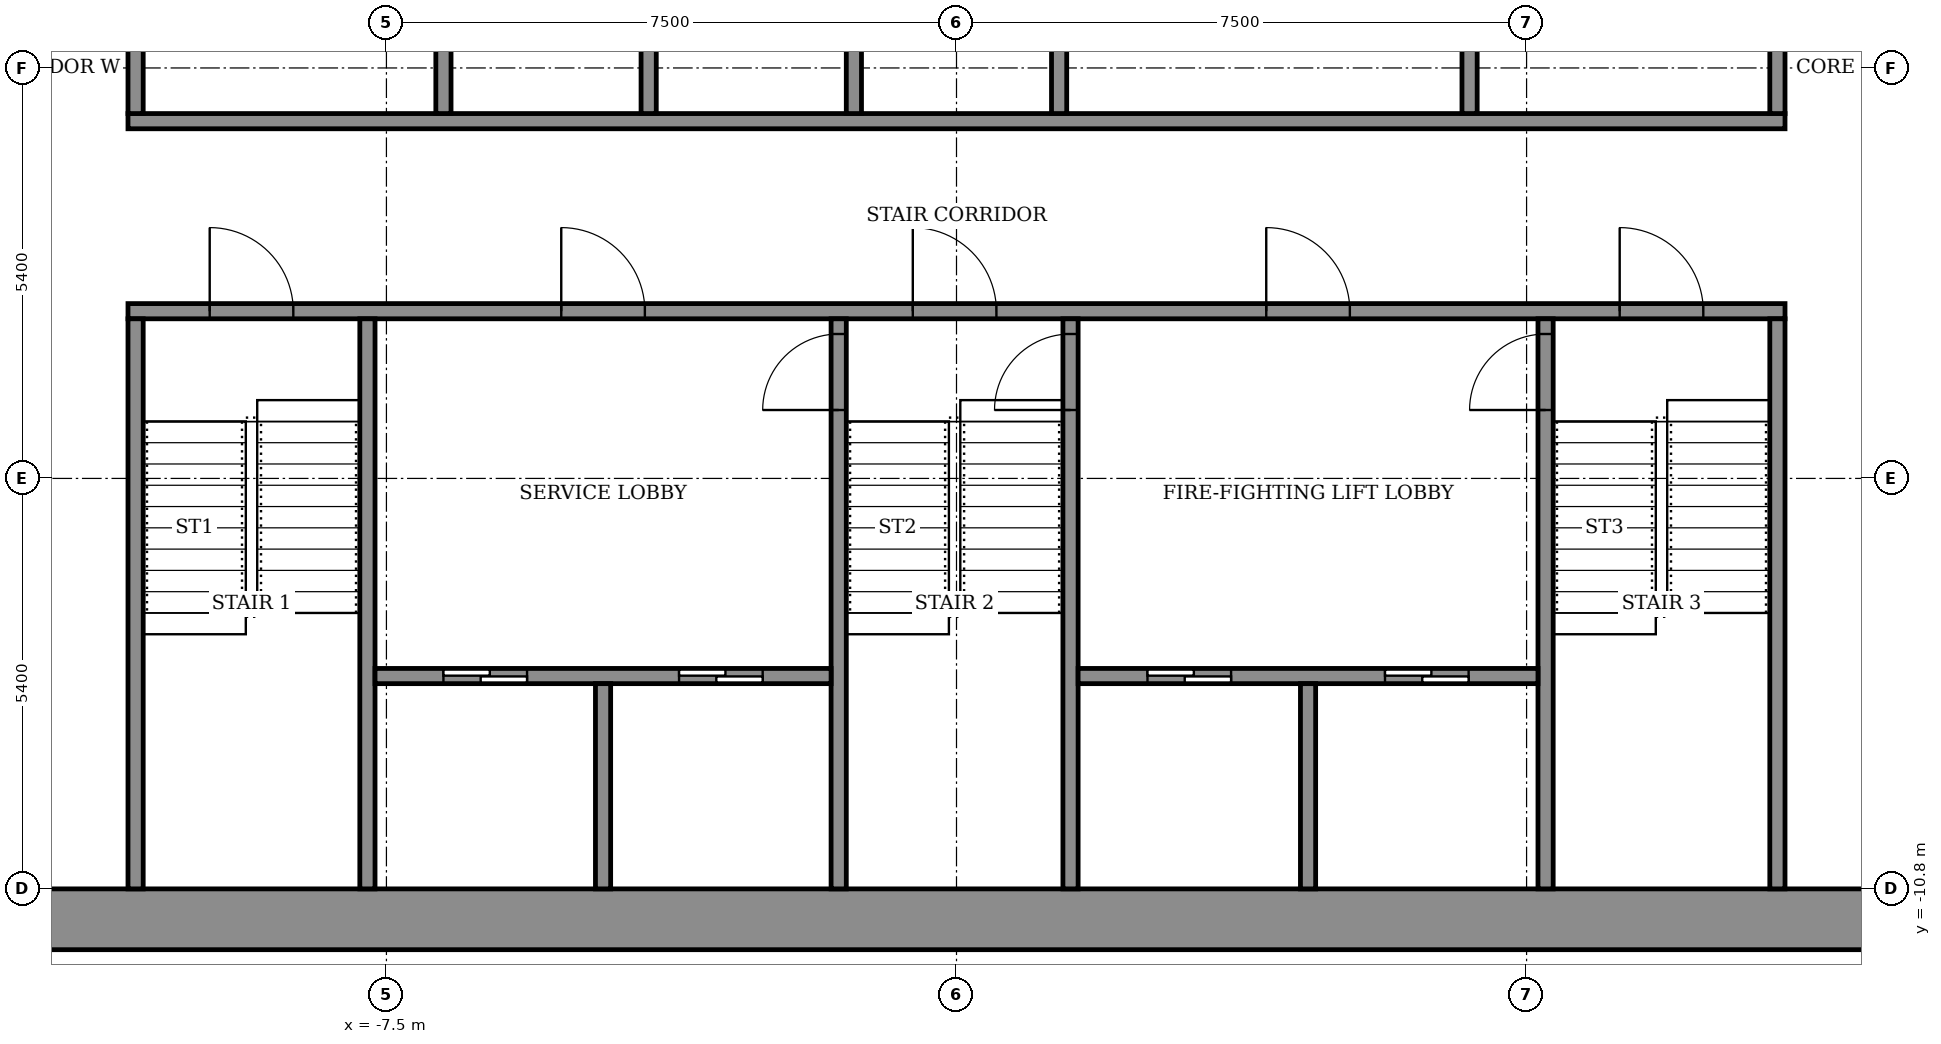
"""IFC4 building model, lengths in metres.
Left out: names, types, materials, properties, quantities, classifications, styles, units other than length and angle.
Written with IfcOpenShell. Run it as: python <this file> out.ifc"""

import sys

from ifc_helpers import new_model, si_unit, direction, frame, frame_2d, origin, place, context, subcontext, project, spatial, rectangle, extrude, element, fill, save


model = new_model("IFC4")
c1 = context("Model", 3, precision=1e-05, world=origin(), true_north=direction((0.0, 1.0)))
c2 = subcontext(c1, "Body", "Model", "MODEL_VIEW")
j1 = project(units=[si_unit("LENGTHUNIT", "METRE"), si_unit("PLANEANGLEUNIT", "RADIAN")], contexts=[c1])
p1 = place(None, origin())
s1 = spatial("IfcSite", under=j1, at=p1, CompositionType="ELEMENT")
p2 = place(p1, origin())
s2 = spatial("IfcBuilding", under=s1, at=p2, CompositionType="ELEMENT")
p3 = place(p2, frame((0.0, 0.0, 249.1)))
s3 = spatial("IfcBuildingStorey", under=s2, at=p3, CompositionType="ELEMENT", Elevation=249.1)
p4 = place(p3, frame((-14.6, -11.2, 0.0), z_axis=(0.0, 0.0, 1.0), x_axis=(1.0, 0.0, 0.0)))
e1 = element("IfcWall", 1, at=p4, inside=s3, PredefinedType="SHEAR", context=c2, shape_type="SweptSolid", body=[
    extrude(rectangle(XDim=29.2, YDim=0.8, at=frame_2d((14.6, 0.0))), origin(), (0.0, 0.0, 1.0), 3.6),
])
p5 = place(p3, frame((-10.9, -3.2, 0.0), z_axis=(0.0, 0.0, 1.0), x_axis=(1.0, 0.0, 0.0)))
e2 = element("IfcWall", 2, at=p5, inside=s3, PredefinedType="SHEAR", context=c2, shape_type="SweptSolid", body=[
    extrude(rectangle(XDim=21.8, YDim=0.2, at=frame_2d((10.9, 0.0))), origin(), (0.0, 0.0, 1.0), 3.05),
])
p6 = place(p5, frame((1.075, 0.0, 0.0)))
e3 = element("IfcOpeningElement", 3, at=p6, cuts=e2, PredefinedType="OPENING", context=c2, shape_type="SweptSolid", body=[
    extrude(rectangle(XDim=1.1, YDim=2.1, at=frame_2d((0.55, 1.05))), frame((0.0, 0.11, 0.0), z_axis=(0.0, -1.0, 0.0), x_axis=(1.0, 0.0, 0.0)), (0.0, 0.0, 1.0), 0.22),
])
p7 = place(p5, frame((10.325, 0.0, 0.0)))
e4 = element("IfcOpeningElement", 4, at=p7, cuts=e2, PredefinedType="OPENING", context=c2, shape_type="SweptSolid", body=[
    extrude(rectangle(XDim=1.1, YDim=2.1, at=frame_2d((0.55, 1.05))), frame((0.0, 0.11, 0.0), z_axis=(0.0, -1.0, 0.0), x_axis=(1.0, 0.0, 0.0)), (0.0, 0.0, 1.0), 0.22),
])
p8 = place(p5, frame((19.625, 0.0, 0.0)))
e5 = element("IfcOpeningElement", 5, at=p8, cuts=e2, PredefinedType="OPENING", context=c2, shape_type="SweptSolid", body=[
    extrude(rectangle(XDim=1.1, YDim=2.1, at=frame_2d((0.55, 1.05))), frame((0.0, 0.11, 0.0), z_axis=(0.0, -1.0, 0.0), x_axis=(1.0, 0.0, 0.0)), (0.0, 0.0, 1.0), 0.22),
])
p9 = place(p5, frame((5.7, 0.0, 0.0)))
e6 = element("IfcOpeningElement", 6, at=p9, cuts=e2, PredefinedType="OPENING", context=c2, shape_type="SweptSolid", body=[
    extrude(rectangle(XDim=1.1, YDim=2.1, at=frame_2d((0.55, 1.05))), frame((0.0, 0.11, 0.0), z_axis=(0.0, -1.0, 0.0), x_axis=(1.0, 0.0, 0.0)), (0.0, 0.0, 1.0), 0.22),
])
p10 = place(p5, frame((14.975, 0.0, 0.0)))
e7 = element("IfcOpeningElement", 7, at=p10, cuts=e2, PredefinedType="OPENING", context=c2, shape_type="SweptSolid", body=[
    extrude(rectangle(XDim=1.1, YDim=2.1, at=frame_2d((0.55, 1.05))), frame((0.0, 0.11, 0.0), z_axis=(0.0, -1.0, 0.0), x_axis=(1.0, 0.0, 0.0)), (0.0, 0.0, 1.0), 0.22),
])
p11 = place(p3, frame((-10.9, -0.7, 0.0), z_axis=(0.0, 0.0, 1.0), x_axis=(1.0, 0.0, 0.0)))
e8 = element("IfcWall", 8, at=p11, inside=s3, PredefinedType="SHEAR", context=c2, shape_type="SweptSolid", body=[
    extrude(rectangle(XDim=21.8, YDim=0.2, at=frame_2d((10.9, 0.0))), origin(), (0.0, 0.0, 1.0), 3.05),
])
for number, where, z_axis, x_axis in (
    (9, (-10.8, -10.8, 0.0), (0.0, 0.0, 1.0), (0.0, 1.0, 0.0)),
    (10, (-7.75, -10.8, 0.0), (0.0, 0.0, 1.0), (0.0, 1.0, 0.0)),
):
    element("IfcWall", number, at=place(p3, frame(where, z_axis=z_axis, x_axis=x_axis)), inside=s3, PredefinedType="SHEAR", context=c2, shape_type="SweptSolid", body=[
        extrude(rectangle(XDim=7.5, YDim=0.2, at=frame_2d((3.75, 0.0))), origin(), (0.0, 0.0, 1.0), 3.05),
    ])
p12 = place(p3, frame((-1.55, -10.8, 0.0), z_axis=(0.0, 0.0, 1.0), x_axis=(0.0, 1.0, 0.0)))
e11 = element("IfcWall", 11, at=p12, inside=s3, PredefinedType="SHEAR", context=c2, shape_type="SweptSolid", body=[
    extrude(rectangle(XDim=7.5, YDim=0.2, at=frame_2d((3.75, 0.0))), origin(), (0.0, 0.0, 1.0), 3.05),
])
p13 = place(p12, frame((6.3, 0.0, 0.0)))
e12 = element("IfcOpeningElement", 12, at=p13, cuts=e11, PredefinedType="OPENING", context=c2, shape_type="SweptSolid", body=[
    extrude(rectangle(XDim=1.0, YDim=2.1, at=frame_2d((0.5, 1.05))), frame((0.0, 0.11, 0.0), z_axis=(0.0, -1.0, 0.0), x_axis=(1.0, 0.0, 0.0)), (0.0, 0.0, 1.0), 0.22),
])
p14 = place(p3, frame((1.5, -10.8, 0.0), z_axis=(0.0, 0.0, 1.0), x_axis=(0.0, 1.0, 0.0)))
e13 = element("IfcWall", 13, at=p14, inside=s3, PredefinedType="SHEAR", context=c2, shape_type="SweptSolid", body=[
    extrude(rectangle(XDim=7.5, YDim=0.2, at=frame_2d((3.75, 0.0))), origin(), (0.0, 0.0, 1.0), 3.05),
])
p15 = place(p14, frame((6.3, 0.0, 0.0)))
e14 = element("IfcOpeningElement", 14, at=p15, cuts=e13, PredefinedType="OPENING", context=c2, shape_type="SweptSolid", body=[
    extrude(rectangle(XDim=1.0, YDim=2.1, at=frame_2d((0.5, 1.05))), frame((0.0, 0.11, 0.0), z_axis=(0.0, -1.0, 0.0), x_axis=(1.0, 0.0, 0.0)), (0.0, 0.0, 1.0), 0.22),
])
p16 = place(p3, frame((7.75, -10.8, 0.0), z_axis=(0.0, 0.0, 1.0), x_axis=(0.0, 1.0, 0.0)))
e15 = element("IfcWall", 15, at=p16, inside=s3, PredefinedType="SHEAR", context=c2, shape_type="SweptSolid", body=[
    extrude(rectangle(XDim=7.5, YDim=0.2, at=frame_2d((3.75, 0.0))), origin(), (0.0, 0.0, 1.0), 3.05),
])
p17 = place(p16, frame((6.3, 0.0, 0.0)))
e16 = element("IfcOpeningElement", 16, at=p17, cuts=e15, PredefinedType="OPENING", context=c2, shape_type="SweptSolid", body=[
    extrude(rectangle(XDim=1.0, YDim=2.1, at=frame_2d((0.5, 1.05))), frame((0.0, 0.11, 0.0), z_axis=(0.0, -1.0, 0.0), x_axis=(1.0, 0.0, 0.0)), (0.0, 0.0, 1.0), 0.22),
])
p18 = place(p3, frame((10.8, -10.8, 0.0), z_axis=(0.0, 0.0, 1.0), x_axis=(0.0, 1.0, 0.0)))
e17 = element("IfcWall", 17, at=p18, inside=s3, PredefinedType="SHEAR", context=c2, shape_type="SweptSolid", body=[
    extrude(rectangle(XDim=7.5, YDim=0.2, at=frame_2d((3.75, 0.0))), origin(), (0.0, 0.0, 1.0), 3.05),
])
p19 = place(p3, frame((-7.65, -8.0, 0.0), z_axis=(0.0, 0.0, 1.0), x_axis=(1.0, 0.0, 0.0)))
e18 = element("IfcWall", 18, at=p19, inside=s3, PredefinedType="SHEAR", context=c2, shape_type="SweptSolid", body=[
    extrude(rectangle(XDim=6.0, YDim=0.2, at=frame_2d((3.0, 0.0))), origin(), (0.0, 0.0, 1.0), 3.05),
])
p20 = place(p19, frame((0.9, 0.0, 0.0)))
e19 = element("IfcOpeningElement", 19, at=p20, cuts=e18, PredefinedType="OPENING", context=c2, shape_type="SweptSolid", body=[
    extrude(rectangle(XDim=1.1, YDim=2.1, at=frame_2d((0.55, 1.05))), frame((0.0, 0.11, 0.0), z_axis=(0.0, -1.0, 0.0), x_axis=(1.0, 0.0, 0.0)), (0.0, 0.0, 1.0), 0.22),
])
p21 = place(p19, frame((4.0, 0.0, 0.0)))
e20 = element("IfcOpeningElement", 20, at=p21, cuts=e18, PredefinedType="OPENING", context=c2, shape_type="SweptSolid", body=[
    extrude(rectangle(XDim=1.1, YDim=2.1, at=frame_2d((0.55, 1.05))), frame((0.0, 0.11, 0.0), z_axis=(0.0, -1.0, 0.0), x_axis=(1.0, 0.0, 0.0)), (0.0, 0.0, 1.0), 0.22),
])
p22 = place(p3, frame((-4.65, -10.8, 0.0), z_axis=(0.0, 0.0, 1.0), x_axis=(0.0, 1.0, 0.0)))
e21 = element("IfcWall", 21, at=p22, inside=s3, PredefinedType="SHEAR", context=c2, shape_type="SweptSolid", body=[
    extrude(rectangle(XDim=2.7, YDim=0.2, at=frame_2d((1.35, 0.0))), origin(), (0.0, 0.0, 1.0), 3.05),
])
p23 = place(p3, frame((1.6, -8.0, 0.0), z_axis=(0.0, 0.0, 1.0), x_axis=(1.0, 0.0, 0.0)))
e22 = element("IfcWall", 22, at=p23, inside=s3, PredefinedType="SHEAR", context=c2, shape_type="SweptSolid", body=[
    extrude(rectangle(XDim=6.05, YDim=0.2, at=frame_2d((3.025, 0.0))), origin(), (0.0, 0.0, 1.0), 3.05),
])
p24 = place(p23, frame((0.913, 0.0, 0.0)))
e23 = element("IfcOpeningElement", 23, at=p24, cuts=e22, PredefinedType="OPENING", context=c2, shape_type="SweptSolid", body=[
    extrude(rectangle(XDim=1.1, YDim=2.1, at=frame_2d((0.55, 1.05))), frame((0.0, 0.11, 0.0), z_axis=(0.0, -1.0, 0.0), x_axis=(1.0, 0.0, 0.0)), (0.0, 0.0, 1.0), 0.22),
])
p25 = place(p23, frame((4.038, 0.0, 0.0)))
e24 = element("IfcOpeningElement", 24, at=p25, cuts=e22, PredefinedType="OPENING", context=c2, shape_type="SweptSolid", body=[
    extrude(rectangle(XDim=1.1, YDim=2.1, at=frame_2d((0.55, 1.05))), frame((0.0, 0.11, 0.0), z_axis=(0.0, -1.0, 0.0), x_axis=(1.0, 0.0, 0.0)), (0.0, 0.0, 1.0), 0.22),
])
p26 = place(p3, frame((4.625, -10.8, 0.0), z_axis=(0.0, 0.0, 1.0), x_axis=(0.0, 1.0, 0.0)))
e25 = element("IfcWall", 25, at=p26, inside=s3, PredefinedType="SHEAR", context=c2, shape_type="SweptSolid", body=[
    extrude(rectangle(XDim=2.7, YDim=0.2, at=frame_2d((1.35, 0.0))), origin(), (0.0, 0.0, 1.0), 3.05),
])
p27 = place(p3, frame((-10.8, -0.6, 0.0), z_axis=(0.0, 0.0, 1.0), x_axis=(0.0, 1.0, 0.0)))
e26 = element("IfcWall", 26, at=p27, inside=s3, PredefinedType="STANDARD", context=c2, shape_type="SweptSolid", body=[
    extrude(rectangle(XDim=2.5, YDim=0.2, at=frame_2d((1.25, 0.0))), origin(), (0.0, 0.0, 1.0), 3.05),
])
for number, where, z_axis, x_axis in (
    (27, (-6.75, -0.6, 0.0), (0.0, 0.0, 1.0), (0.0, 1.0, 0.0)),
    (28, (-4.05, -0.6, 0.0), (0.0, 0.0, 1.0), (0.0, 1.0, 0.0)),
    (29, (-1.35, -0.6, 0.0), (0.0, 0.0, 1.0), (0.0, 1.0, 0.0)),
    (30, (1.35, -0.6, 0.0), (0.0, 0.0, 1.0), (0.0, 1.0, 0.0)),
):
    element("IfcWall", number, at=place(p3, frame(where, z_axis=z_axis, x_axis=x_axis)), inside=s3, PredefinedType="SHEAR", context=c2, shape_type="SweptSolid", body=[
        extrude(rectangle(XDim=2.5, YDim=0.2, at=frame_2d((1.25, 0.0))), origin(), (0.0, 0.0, 1.0), 3.05),
    ])
for number, where, z_axis, x_axis in (
    (31, (6.75, -0.6, 0.0), (0.0, 0.0, 1.0), (0.0, 1.0, 0.0)),
    (32, (10.8, -0.6, 0.0), (0.0, 0.0, 1.0), (0.0, 1.0, 0.0)),
):
    element("IfcWall", number, at=place(p3, frame(where, z_axis=z_axis, x_axis=x_axis)), inside=s3, PredefinedType="STANDARD", context=c2, shape_type="SweptSolid", body=[
        extrude(rectangle(XDim=2.5, YDim=0.2, at=frame_2d((1.25, 0.0))), origin(), (0.0, 0.0, 1.0), 3.05),
    ])
p28 = place(p24, origin())
e33 = element("IfcDoor", 33, at=p28, inside=s3, OperationType="SLIDING_TO_LEFT", PredefinedType="DOOR", context=c2, shape_type="SweptSolid", body=[
    extrude(rectangle(XDim=1.1, YDim=2.1, at=frame_2d((0.55, 1.05))), frame((0.0, 0.025, 0.0), z_axis=(0.0, -1.0, 0.0), x_axis=(1.0, 0.0, 0.0)), (0.0, 0.0, 1.0), 0.05),
])
fill(e23, e33)
p29 = place(p20, origin())
e34 = element("IfcDoor", 34, at=p29, inside=s3, OperationType="SLIDING_TO_LEFT", PredefinedType="DOOR", context=c2, shape_type="SweptSolid", body=[
    extrude(rectangle(XDim=1.1, YDim=2.1, at=frame_2d((0.55, 1.05))), frame((0.0, 0.025, 0.0), z_axis=(0.0, -1.0, 0.0), x_axis=(1.0, 0.0, 0.0)), (0.0, 0.0, 1.0), 0.05),
])
fill(e19, e34)
p30 = place(p25, origin())
e35 = element("IfcDoor", 35, at=p30, inside=s3, OperationType="SLIDING_TO_LEFT", PredefinedType="DOOR", context=c2, shape_type="SweptSolid", body=[
    extrude(rectangle(XDim=1.1, YDim=2.1, at=frame_2d((0.55, 1.05))), frame((0.0, 0.025, 0.0), z_axis=(0.0, -1.0, 0.0), x_axis=(1.0, 0.0, 0.0)), (0.0, 0.0, 1.0), 0.05),
])
fill(e24, e35)
p31 = place(p21, origin())
e36 = element("IfcDoor", 36, at=p31, inside=s3, OperationType="SLIDING_TO_LEFT", PredefinedType="DOOR", context=c2, shape_type="SweptSolid", body=[
    extrude(rectangle(XDim=1.1, YDim=2.1, at=frame_2d((0.55, 1.05))), frame((0.0, 0.025, 0.0), z_axis=(0.0, -1.0, 0.0), x_axis=(1.0, 0.0, 0.0)), (0.0, 0.0, 1.0), 0.05),
])
fill(e20, e36)
p32 = place(p6, origin())
e37 = element("IfcDoor", 37, at=p32, inside=s3, OperationType="SINGLE_SWING_RIGHT", PredefinedType="DOOR", context=c2, shape_type="SweptSolid", body=[
    extrude(rectangle(XDim=1.1, YDim=2.1, at=frame_2d((0.55, 1.05))), frame((0.0, 0.025, 0.0), z_axis=(0.0, -1.0, 0.0), x_axis=(1.0, 0.0, 0.0)), (0.0, 0.0, 1.0), 0.05),
])
fill(e3, e37)
p33 = place(p7, origin())
e38 = element("IfcDoor", 38, at=p33, inside=s3, OperationType="SINGLE_SWING_RIGHT", PredefinedType="DOOR", context=c2, shape_type="SweptSolid", body=[
    extrude(rectangle(XDim=1.1, YDim=2.1, at=frame_2d((0.55, 1.05))), frame((0.0, 0.025, 0.0), z_axis=(0.0, -1.0, 0.0), x_axis=(1.0, 0.0, 0.0)), (0.0, 0.0, 1.0), 0.05),
])
fill(e4, e38)
p34 = place(p8, origin())
e39 = element("IfcDoor", 39, at=p34, inside=s3, OperationType="SINGLE_SWING_RIGHT", PredefinedType="DOOR", context=c2, shape_type="SweptSolid", body=[
    extrude(rectangle(XDim=1.1, YDim=2.1, at=frame_2d((0.55, 1.05))), frame((0.0, 0.025, 0.0), z_axis=(0.0, -1.0, 0.0), x_axis=(1.0, 0.0, 0.0)), (0.0, 0.0, 1.0), 0.05),
])
fill(e5, e39)
p35 = place(p9, origin())
e40 = element("IfcDoor", 40, at=p35, inside=s3, OperationType="SINGLE_SWING_LEFT", PredefinedType="DOOR", context=c2, shape_type="SweptSolid", body=[
    extrude(rectangle(XDim=1.1, YDim=2.1, at=frame_2d((0.55, 1.05))), frame((0.0, 0.025, 0.0), z_axis=(0.0, -1.0, 0.0), x_axis=(1.0, 0.0, 0.0)), (0.0, 0.0, 1.0), 0.05),
])
fill(e6, e40)
p36 = place(p10, origin())
e41 = element("IfcDoor", 41, at=p36, inside=s3, OperationType="SINGLE_SWING_LEFT", PredefinedType="DOOR", context=c2, shape_type="SweptSolid", body=[
    extrude(rectangle(XDim=1.1, YDim=2.1, at=frame_2d((0.55, 1.05))), frame((0.0, 0.025, 0.0), z_axis=(0.0, -1.0, 0.0), x_axis=(1.0, 0.0, 0.0)), (0.0, 0.0, 1.0), 0.05),
])
fill(e7, e41)
p37 = place(p13, origin())
e42 = element("IfcDoor", 42, at=p37, inside=s3, OperationType="SINGLE_SWING_RIGHT", PredefinedType="DOOR", context=c2, shape_type="SweptSolid", body=[
    extrude(rectangle(XDim=1.0, YDim=2.1, at=frame_2d((0.5, 1.05))), frame((0.0, 0.025, 0.0), z_axis=(0.0, -1.0, 0.0), x_axis=(1.0, 0.0, 0.0)), (0.0, 0.0, 1.0), 0.05),
])
fill(e12, e42)
p38 = place(p15, origin())
e43 = element("IfcDoor", 43, at=p38, inside=s3, OperationType="SINGLE_SWING_RIGHT", PredefinedType="DOOR", context=c2, shape_type="SweptSolid", body=[
    extrude(rectangle(XDim=1.0, YDim=2.1, at=frame_2d((0.5, 1.05))), frame((0.0, 0.025, 0.0), z_axis=(0.0, -1.0, 0.0), x_axis=(1.0, 0.0, 0.0)), (0.0, 0.0, 1.0), 0.05),
])
fill(e14, e43)
p39 = place(p17, origin())
e44 = element("IfcDoor", 44, at=p39, inside=s3, OperationType="SINGLE_SWING_RIGHT", PredefinedType="DOOR", context=c2, shape_type="SweptSolid", body=[
    extrude(rectangle(XDim=1.0, YDim=2.1, at=frame_2d((0.5, 1.05))), frame((0.0, 0.025, 0.0), z_axis=(0.0, -1.0, 0.0), x_axis=(1.0, 0.0, 0.0)), (0.0, 0.0, 1.0), 0.05),
])
fill(e16, e44)
save(model, sys.argv[1])
